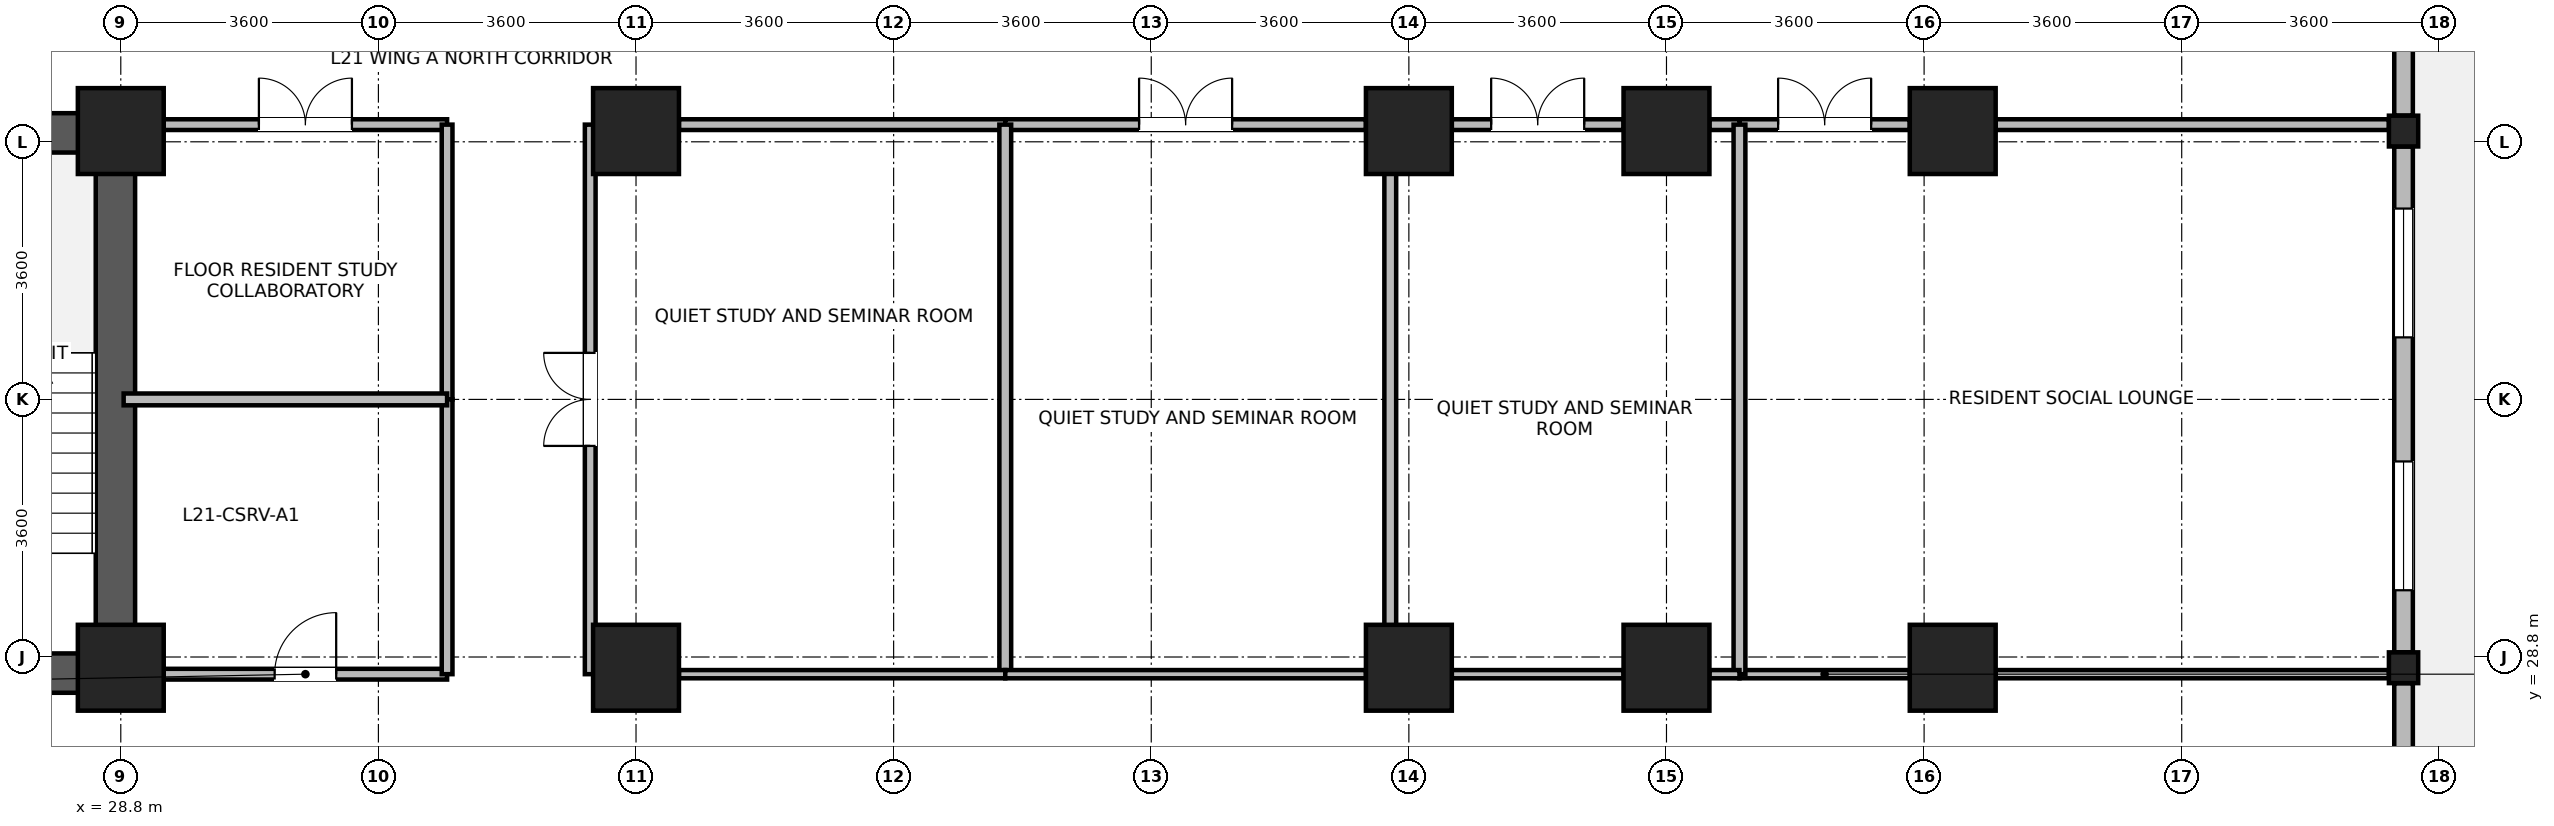
"""IFC4 building model, lengths in metres.
Left out: names, types, materials, properties, quantities, classifications, styles, units other than length and angle.
Written with IfcOpenShell. Run it as: python <this file> out.ifc"""

import sys

from ifc_helpers import new_model, si_unit, direction, frame, frame_2d, origin, origin_2d, place, context, subcontext, project, spatial, rectangle, i_section, extrude, source, transform, mapped, element, fill, save


model = new_model("IFC4")
c1 = context("Model", 3, precision=1e-05, world=origin(), true_north=direction((0.0, 1.0)))
c2 = subcontext(c1, "Body", "Model", "MODEL_VIEW")
j1 = project(units=[si_unit("LENGTHUNIT", "METRE"), si_unit("PLANEANGLEUNIT", "RADIAN")], contexts=[c1])
p1 = place(None, origin())
s1 = spatial("IfcSite", under=j1, at=p1, CompositionType="ELEMENT")
p2 = place(p1, origin())
s2 = spatial("IfcBuilding", under=s1, at=p2, CompositionType="ELEMENT")
p3 = place(p2, frame((0.0, 0.0, 86.0)))
s3 = spatial("IfcBuildingStorey", under=s2, at=p3, CompositionType="ELEMENT", Elevation=86.0)
p4 = place(p3, frame((28.725, 28.3, 0.0), z_axis=(0.0, 0.0, 1.0), x_axis=(0.0, 1.0, 0.0)))
e1 = element("IfcWall", 1, at=p4, inside=s3, PredefinedType="SHEAR", context=c2, shape_type="SweptSolid", body=[
    extrude(rectangle(XDim=8.1, YDim=0.55, at=frame_2d((4.05, 0.0))), origin(), (0.0, 0.0, 1.0), 3.45),
])
for number, where, z_axis, x_axis in (
    (2, (25.25, 28.575, 0.0), (0.0, 0.0, 1.0), (1.0, 0.0, 0.0)),
    (3, (25.25, 36.125, 0.0), (0.0, 0.0, 1.0), (1.0, 0.0, 0.0)),
):
    element("IfcWall", number, at=place(p3, frame(where, z_axis=z_axis, x_axis=x_axis)), inside=s3, PredefinedType="SHEAR", context=c2, shape_type="SweptSolid", body=[
        extrude(rectangle(XDim=3.2, YDim=0.55, at=frame_2d((1.6, 0.0))), origin(), (0.0, 0.0, 1.0), 3.45),
    ])
m1 = source(origin(), c2, "Body", "SweptSolid", [
    extrude(rectangle(XDim=1.2, YDim=1.2, at=origin_2d()), origin(), (0.0, 0.0, 1.0), 3.7),
])
for number, where, z_axis, x_axis in (
    (4, (28.8, 28.65, 0.0), (0.0, 0.0, 1.0), (1.0, 0.0, 0.0)),
    (5, (28.8, 36.15, 0.0), (0.0, 0.0, 1.0), (1.0, 0.0, 0.0)),
    (6, (36.0, 28.65, 0.0), (0.0, 0.0, 1.0), (1.0, 0.0, 0.0)),
    (7, (36.0, 36.15, 0.0), (0.0, 0.0, 1.0), (1.0, 0.0, 0.0)),
    (8, (46.8, 28.65, 0.0), (0.0, 0.0, 1.0), (1.0, 0.0, 0.0)),
    (9, (46.8, 36.15, 0.0), (0.0, 0.0, 1.0), (1.0, 0.0, 0.0)),
    (10, (50.4, 28.65, 0.0), (0.0, 0.0, 1.0), (1.0, 0.0, 0.0)),
    (11, (50.4, 36.15, 0.0), (0.0, 0.0, 1.0), (1.0, 0.0, 0.0)),
    (12, (54.4, 28.65, 0.0), (0.0, 0.0, 1.0), (1.0, 0.0, 0.0)),
    (13, (54.4, 36.15, 0.0), (0.0, 0.0, 1.0), (1.0, 0.0, 0.0)),
):
    element("IfcColumn", number, at=place(p3, frame(where, z_axis=z_axis, x_axis=x_axis)), inside=s3, PredefinedType="COLUMN", context=c2, shape_type="MappedRepresentation", body=[
        mapped(m1, transform((0.0, 0.0, 0.0), x_axis=(1.0, 0.0, 0.0), y_axis=(0.0, 1.0, 0.0), z_axis=(0.0, 0.0, 1.0), scale=1.0)),
    ])
m2 = source(origin(), c2, "Body", "SweptSolid", [
    extrude(i_section(OverallWidth=0.409, OverallDepth=0.43, WebThickness=0.024, FlangeThickness=0.033, FilletRadius=0.015, at=origin_2d()), origin(), (0.0, 0.0, 1.0), 3.7),
])
for number, where, z_axis, x_axis in (
    (14, (60.7, 28.65, 0.0), (0.0, 0.0, 1.0), (1.0, 0.0, 0.0)),
    (15, (60.7, 36.15, 0.0), (0.0, 0.0, 1.0), (1.0, 0.0, 0.0)),
):
    element("IfcColumn", number, at=place(p3, frame(where, z_axis=z_axis, x_axis=x_axis)), inside=s3, PredefinedType="COLUMN", context=c2, shape_type="MappedRepresentation", body=[
        mapped(m2, transform((0.0, 0.0, 0.0), x_axis=(1.0, 0.0, 0.0), y_axis=(0.0, 1.0, 0.0), z_axis=(0.0, 0.0, 1.0), scale=1.0)),
    ])
p5 = place(p3, frame((60.7, 28.434, 0.0), z_axis=(0.0, 0.0, 1.0), x_axis=(0.0, -1.0, 0.0)))
e16 = element("IfcWall", 16, at=p5, inside=s3, PredefinedType="STANDARD", context=c2, shape_type="SweptSolid", body=[
    extrude(rectangle(XDim=6.618, YDim=0.26, at=frame_2d((3.309, 0.0))), origin(), (0.0, 0.0, 1.0), 2.93),
])
p6 = place(p5, frame((4.063, 0.0, 0.85)))
e17 = element("IfcOpeningElement", 17, at=p6, cuts=e16, PredefinedType="OPENING", context=c2, shape_type="SweptSolid", body=[
    extrude(rectangle(XDim=1.8, YDim=1.85, at=frame_2d((0.9, 0.925))), frame((0.0, 0.14, 0.0), z_axis=(0.0, -1.0, 0.0), x_axis=(1.0, 0.0, 0.0)), (0.0, 0.0, 1.0), 0.28),
])
p7 = place(p5, frame((2.305, 0.0, 0.85)))
e18 = element("IfcOpeningElement", 18, at=p7, cuts=e16, PredefinedType="OPENING", context=c2, shape_type="SweptSolid", body=[
    extrude(rectangle(XDim=0.95, YDim=1.75, at=frame_2d((0.475, 0.875))), frame((0.0, 0.14, 0.0), z_axis=(0.0, -1.0, 0.0), x_axis=(1.0, 0.0, 0.0)), (0.0, 0.0, 1.0), 0.28),
])
p8 = place(p3, frame((60.7, 35.934, 0.0), z_axis=(0.0, 0.0, 1.0), x_axis=(0.0, -1.0, 0.0)))
e19 = element("IfcWall", 19, at=p8, inside=s3, PredefinedType="STANDARD", context=c2, shape_type="SweptSolid", body=[
    extrude(rectangle(XDim=7.068, YDim=0.26, at=frame_2d((3.534, 0.0))), origin(), (0.0, 0.0, 1.0), 2.93),
])
p9 = place(p8, frame((0.867, 0.0, 0.85)))
e20 = element("IfcOpeningElement", 20, at=p9, cuts=e19, PredefinedType="OPENING", context=c2, shape_type="SweptSolid", body=[
    extrude(rectangle(XDim=1.8, YDim=1.85, at=frame_2d((0.9, 0.925))), frame((0.0, 0.14, 0.0), z_axis=(0.0, -1.0, 0.0), x_axis=(1.0, 0.0, 0.0)), (0.0, 0.0, 1.0), 0.28),
])
p10 = place(p8, frame((4.401, 0.0, 0.85)))
e21 = element("IfcOpeningElement", 21, at=p10, cuts=e19, PredefinedType="OPENING", context=c2, shape_type="SweptSolid", body=[
    extrude(rectangle(XDim=1.8, YDim=1.85, at=frame_2d((0.9, 0.925))), frame((0.0, 0.14, 0.0), z_axis=(0.0, -1.0, 0.0), x_axis=(1.0, 0.0, 0.0)), (0.0, 0.0, 1.0), 0.28),
])
p11 = place(p3, frame((60.7, 43.33, 0.0), z_axis=(0.0, 0.0, 1.0), x_axis=(0.0, -1.0, 0.0)))
e22 = element("IfcWall", 22, at=p11, inside=s3, PredefinedType="STANDARD", context=c2, shape_type="SweptSolid", body=[
    extrude(rectangle(XDim=6.964, YDim=0.26, at=frame_2d((3.482, 0.0))), origin(), (0.0, 0.0, 1.0), 3.43),
])
p12 = place(p11, frame((0.841, 0.0, 0.85)))
e23 = element("IfcOpeningElement", 23, at=p12, cuts=e22, PredefinedType="OPENING", context=c2, shape_type="SweptSolid", body=[
    extrude(rectangle(XDim=1.8, YDim=1.85, at=frame_2d((0.9, 0.925))), frame((0.0, 0.14, 0.0), z_axis=(0.0, -1.0, 0.0), x_axis=(1.0, 0.0, 0.0)), (0.0, 0.0, 1.0), 0.28),
])
p13 = place(p11, frame((3.007, 0.0, 0.85)))
e24 = element("IfcOpeningElement", 24, at=p13, cuts=e22, PredefinedType="OPENING", context=c2, shape_type="SweptSolid", body=[
    extrude(rectangle(XDim=0.95, YDim=1.75, at=frame_2d((0.475, 0.875))), frame((0.0, 0.14, 0.0), z_axis=(0.0, -1.0, 0.0), x_axis=(1.0, 0.0, 0.0)), (0.0, 0.0, 1.0), 0.28),
])
p14 = place(p3, frame((51.42, 36.24, 0.0), z_axis=(0.0, 0.0, 1.0), x_axis=(1.0, 0.0, 0.0)))
e25 = element("IfcWall", 25, at=p14, inside=s3, PredefinedType="PARTITIONING", context=c2, shape_type="SweptSolid", body=[
    extrude(rectangle(XDim=2.38, YDim=0.15, at=frame_2d((1.19, 0.0))), origin(), (0.0, 0.0, 1.0), 2.78),
])
p15 = place(p14, frame((0.54, 0.0, 0.0)))
e26 = element("IfcOpeningElement", 26, at=p15, cuts=e25, PredefinedType="OPENING", context=c2, shape_type="SweptSolid", body=[
    extrude(rectangle(XDim=1.3, YDim=2.12, at=frame_2d((0.65, 1.06))), frame((0.0, 0.085, 0.0), z_axis=(0.0, -1.0, 0.0), x_axis=(1.0, 0.0, 0.0)), (0.0, 0.0, 1.0), 0.17),
])
p16 = place(p3, frame((55.0, 36.24, 0.0), z_axis=(0.0, 0.0, 1.0), x_axis=(1.0, 0.0, 0.0)))
e27 = element("IfcWall", 27, at=p16, inside=s3, PredefinedType="PARTITIONING", context=c2, shape_type="SweptSolid", body=[
    extrude(rectangle(XDim=5.496, YDim=0.15, at=frame_2d((2.748, 0.0))), origin(), (0.0, 0.0, 1.0), 2.78),
])
p17 = place(p3, frame((35.36, 28.56, 0.0), z_axis=(0.0, 0.0, 1.0), x_axis=(0.0, 1.0, 0.0)))
e28 = element("IfcWall", 28, at=p17, inside=s3, PredefinedType="PARTITIONING", context=c2, shape_type="SweptSolid", body=[
    extrude(rectangle(XDim=7.68, YDim=0.15, at=frame_2d((3.84, 0.0))), origin(), (0.0, 0.0, 1.0), 3.43),
])
p18 = place(p17, frame((3.19, 0.0, 0.0)))
e29 = element("IfcOpeningElement", 29, at=p18, cuts=e28, PredefinedType="OPENING", context=c2, shape_type="SweptSolid", body=[
    extrude(rectangle(XDim=1.3, YDim=2.12, at=frame_2d((0.65, 1.06))), frame((0.0, 0.085, 0.0), z_axis=(0.0, -1.0, 0.0), x_axis=(1.0, 0.0, 0.0)), (0.0, 0.0, 1.0), 0.17),
])
p19 = place(p3, frame((36.6, 36.24, 0.0), z_axis=(0.0, 0.0, 1.0), x_axis=(1.0, 0.0, 0.0)))
e30 = element("IfcWall", 30, at=p19, inside=s3, PredefinedType="PARTITIONING", context=c2, shape_type="SweptSolid", body=[
    extrude(rectangle(XDim=4.56, YDim=0.15, at=frame_2d((2.28, 0.0))), origin(), (0.0, 0.0, 1.0), 2.78),
])
p20 = place(p3, frame((41.16, 36.24, 0.0), z_axis=(0.0, 0.0, 1.0), x_axis=(1.0, 0.0, 0.0)))
e31 = element("IfcWall", 31, at=p20, inside=s3, PredefinedType="PARTITIONING", context=c2, shape_type="SweptSolid", body=[
    extrude(rectangle(XDim=5.04, YDim=0.15, at=frame_2d((2.52, 0.0))), origin(), (0.0, 0.0, 1.0), 2.78),
])
p21 = place(p20, frame((1.87, 0.0, 0.0)))
e32 = element("IfcOpeningElement", 32, at=p21, cuts=e31, PredefinedType="OPENING", context=c2, shape_type="SweptSolid", body=[
    extrude(rectangle(XDim=1.3, YDim=2.12, at=frame_2d((0.65, 1.06))), frame((0.0, 0.085, 0.0), z_axis=(0.0, -1.0, 0.0), x_axis=(1.0, 0.0, 0.0)), (0.0, 0.0, 1.0), 0.17),
])
p22 = place(p3, frame((47.4, 36.24, 0.0), z_axis=(0.0, 0.0, 1.0), x_axis=(1.0, 0.0, 0.0)))
e33 = element("IfcWall", 33, at=p22, inside=s3, PredefinedType="PARTITIONING", context=c2, shape_type="SweptSolid", body=[
    extrude(rectangle(XDim=2.4, YDim=0.15, at=frame_2d((1.2, 0.0))), origin(), (0.0, 0.0, 1.0), 2.78),
])
p23 = place(p22, frame((0.55, 0.0, 0.0)))
e34 = element("IfcOpeningElement", 34, at=p23, cuts=e33, PredefinedType="OPENING", context=c2, shape_type="SweptSolid", body=[
    extrude(rectangle(XDim=1.3, YDim=2.12, at=frame_2d((0.65, 1.06))), frame((0.0, 0.085, 0.0), z_axis=(0.0, -1.0, 0.0), x_axis=(1.0, 0.0, 0.0)), (0.0, 0.0, 1.0), 0.17),
])
p24 = place(p3, frame((51.0, 36.24, 0.0), z_axis=(0.0, 0.0, 1.0), x_axis=(1.0, 0.0, 0.0)))
e35 = element("IfcWall", 35, at=p24, inside=s3, PredefinedType="PARTITIONING", context=c2, shape_type="SweptSolid", body=[
    extrude(rectangle(XDim=0.42, YDim=0.15, at=frame_2d((0.21, 0.0))), origin(), (0.0, 0.0, 1.0), 2.78),
])
p25 = place(p3, frame((29.4, 28.56, 0.0), z_axis=(0.0, 0.0, 1.0), x_axis=(1.0, 0.0, 0.0)))
e36 = element("IfcWall", 36, at=p25, inside=s3, PredefinedType="PARTITIONING", context=c2, shape_type="SweptSolid", body=[
    extrude(rectangle(XDim=3.96, YDim=0.15, at=frame_2d((1.98, 0.0))), origin(), (0.0, 0.0, 1.0), 2.78),
])
p26 = place(p25, frame((1.55, 0.0, 0.0)))
e37 = element("IfcOpeningElement", 37, at=p26, cuts=e36, PredefinedType="OPENING", context=c2, shape_type="SweptSolid", body=[
    extrude(rectangle(XDim=0.86, YDim=2.02, at=frame_2d((0.43, 1.01))), frame((0.0, 0.085, 0.0), z_axis=(0.0, -1.0, 0.0), x_axis=(1.0, 0.0, 0.0)), (0.0, 0.0, 1.0), 0.17),
])
p27 = place(p3, frame((29.4, 36.24, 0.0), z_axis=(0.0, 0.0, 1.0), x_axis=(1.0, 0.0, 0.0)))
e38 = element("IfcWall", 38, at=p27, inside=s3, PredefinedType="PARTITIONING", context=c2, shape_type="SweptSolid", body=[
    extrude(rectangle(XDim=3.96, YDim=0.15, at=frame_2d((1.98, 0.0))), origin(), (0.0, 0.0, 1.0), 2.78),
])
p28 = place(p27, frame((1.33, 0.0, 0.0)))
e39 = element("IfcOpeningElement", 39, at=p28, cuts=e38, PredefinedType="OPENING", context=c2, shape_type="SweptSolid", body=[
    extrude(rectangle(XDim=1.3, YDim=2.12, at=frame_2d((0.65, 1.06))), frame((0.0, 0.085, 0.0), z_axis=(0.0, -1.0, 0.0), x_axis=(1.0, 0.0, 0.0)), (0.0, 0.0, 1.0), 0.17),
])
p29 = place(p3, frame((33.36, 32.4, 0.0), z_axis=(0.0, 0.0, 1.0), x_axis=(0.0, 1.0, 0.0)))
e40 = element("IfcWall", 40, at=p29, inside=s3, PredefinedType="PARTITIONING", context=c2, shape_type="SweptSolid", body=[
    extrude(rectangle(XDim=3.84, YDim=0.15, at=frame_2d((1.92, 0.0))), origin(), (0.0, 0.0, 1.0), 3.43),
])
p30 = place(p3, frame((33.36, 28.56, 0.0), z_axis=(0.0, 0.0, 1.0), x_axis=(0.0, 1.0, 0.0)))
e41 = element("IfcWall", 41, at=p30, inside=s3, PredefinedType="PARTITIONING", context=c2, shape_type="SweptSolid", body=[
    extrude(rectangle(XDim=3.84, YDim=0.15, at=frame_2d((1.92, 0.0))), origin(), (0.0, 0.0, 1.0), 3.43),
])
p31 = place(p3, frame((51.42, 28.56, 0.0), z_axis=(0.0, 0.0, 1.0), x_axis=(1.0, 0.0, 0.0)))
e42 = element("IfcWall", 42, at=p31, inside=s3, PredefinedType="PARTITIONING", context=c2, shape_type="SweptSolid", body=[
    extrude(rectangle(XDim=2.38, YDim=0.115, at=frame_2d((1.19, 0.0))), origin(), (0.0, 0.0, 1.0), 2.78),
])
p32 = place(p3, frame((55.0, 28.56, 0.0), z_axis=(0.0, 0.0, 1.0), x_axis=(1.0, 0.0, 0.0)))
e43 = element("IfcWall", 43, at=p32, inside=s3, PredefinedType="PARTITIONING", context=c2, shape_type="SweptSolid", body=[
    extrude(rectangle(XDim=5.496, YDim=0.115, at=frame_2d((2.748, 0.0))), origin(), (0.0, 0.0, 1.0), 2.78),
])
for number, where, z_axis, x_axis in (
    (44, (41.16, 28.56, 0.0), (0.0, 0.0, 1.0), (0.0, 1.0, 0.0)),
    (45, (46.54, 28.56, 0.0), (0.0, 0.0, 1.0), (0.0, 1.0, 0.0)),
    (46, (51.42, 28.56, 0.0), (0.0, 0.0, 1.0), (0.0, 1.0, 0.0)),
):
    element("IfcWall", number, at=place(p3, frame(where, z_axis=z_axis, x_axis=x_axis)), inside=s3, PredefinedType="PARTITIONING", context=c2, shape_type="SweptSolid", body=[
        extrude(rectangle(XDim=7.68, YDim=0.165, at=frame_2d((3.84, 0.0))), origin(), (0.0, 0.0, 1.0), 3.43),
    ])
p33 = place(p3, frame((36.6, 28.56, 0.0), z_axis=(0.0, 0.0, 1.0), x_axis=(1.0, 0.0, 0.0)))
e47 = element("IfcWall", 47, at=p33, inside=s3, PredefinedType="PARTITIONING", context=c2, shape_type="SweptSolid", body=[
    extrude(rectangle(XDim=4.56, YDim=0.115, at=frame_2d((2.28, 0.0))), origin(), (0.0, 0.0, 1.0), 2.78),
])
p34 = place(p3, frame((41.16, 28.56, 0.0), z_axis=(0.0, 0.0, 1.0), x_axis=(1.0, 0.0, 0.0)))
e48 = element("IfcWall", 48, at=p34, inside=s3, PredefinedType="PARTITIONING", context=c2, shape_type="SweptSolid", body=[
    extrude(rectangle(XDim=5.04, YDim=0.115, at=frame_2d((2.52, 0.0))), origin(), (0.0, 0.0, 1.0), 2.78),
])
p35 = place(p3, frame((47.4, 28.56, 0.0), z_axis=(0.0, 0.0, 1.0), x_axis=(1.0, 0.0, 0.0)))
e49 = element("IfcWall", 49, at=p35, inside=s3, PredefinedType="PARTITIONING", context=c2, shape_type="SweptSolid", body=[
    extrude(rectangle(XDim=2.4, YDim=0.115, at=frame_2d((1.2, 0.0))), origin(), (0.0, 0.0, 1.0), 2.78),
])
p36 = place(p3, frame((51.0, 28.56, 0.0), z_axis=(0.0, 0.0, 1.0), x_axis=(1.0, 0.0, 0.0)))
e50 = element("IfcWall", 50, at=p36, inside=s3, PredefinedType="PARTITIONING", context=c2, shape_type="SweptSolid", body=[
    extrude(rectangle(XDim=0.42, YDim=0.115, at=frame_2d((0.21, 0.0))), origin(), (0.0, 0.0, 1.0), 2.78),
])
p37 = place(p3, frame((28.84, 32.4, 0.0), z_axis=(0.0, 0.0, 1.0), x_axis=(1.0, 0.0, 0.0)))
e51 = element("IfcWall", 51, at=p37, inside=s3, PredefinedType="PARTITIONING", context=c2, shape_type="SweptSolid", body=[
    extrude(rectangle(XDim=4.52, YDim=0.165, at=frame_2d((2.26, 0.0))), origin(), (0.0, 0.0, 1.0), 3.43),
])
p38 = place(p9, origin())
e52 = element("IfcWindow", 52, at=p38, inside=s3, PartitioningType="SINGLE_PANEL", PredefinedType="WINDOW", context=c2, shape_type="SweptSolid", body=[
    extrude(rectangle(XDim=1.8, YDim=1.85, at=frame_2d((0.9, 0.925))), frame((0.0, 0.03, 0.0), z_axis=(0.0, -1.0, 0.0), x_axis=(1.0, 0.0, 0.0)), (0.0, 0.0, 1.0), 0.06),
])
fill(e20, e52)
p39 = place(p10, origin())
e53 = element("IfcWindow", 53, at=p39, inside=s3, PartitioningType="SINGLE_PANEL", PredefinedType="WINDOW", context=c2, shape_type="SweptSolid", body=[
    extrude(rectangle(XDim=1.8, YDim=1.85, at=frame_2d((0.9, 0.925))), frame((0.0, 0.03, 0.0), z_axis=(0.0, -1.0, 0.0), x_axis=(1.0, 0.0, 0.0)), (0.0, 0.0, 1.0), 0.06),
])
fill(e21, e53)
p40 = place(p15, origin())
e54 = element("IfcDoor", 54, at=p40, inside=s3, OperationType="DOUBLE_DOOR_SINGLE_SWING", PredefinedType="DOOR", context=c2, shape_type="SweptSolid", body=[
    extrude(rectangle(XDim=1.3, YDim=2.12, at=frame_2d((0.65, 1.06))), frame((0.0, 0.025, 0.0), z_axis=(0.0, -1.0, 0.0), x_axis=(1.0, 0.0, 0.0)), (0.0, 0.0, 1.0), 0.05),
])
fill(e26, e54)
p41 = place(p18, origin())
e55 = element("IfcDoor", 55, at=p41, inside=s3, OperationType="DOUBLE_DOOR_SINGLE_SWING", PredefinedType="DOOR", context=c2, shape_type="SweptSolid", body=[
    extrude(rectangle(XDim=1.3, YDim=2.12, at=frame_2d((0.65, 1.06))), frame((0.0, 0.025, 0.0), z_axis=(0.0, -1.0, 0.0), x_axis=(1.0, 0.0, 0.0)), (0.0, 0.0, 1.0), 0.05),
])
fill(e29, e55)
p42 = place(p21, origin())
e56 = element("IfcDoor", 56, at=p42, inside=s3, OperationType="DOUBLE_DOOR_SINGLE_SWING", PredefinedType="DOOR", context=c2, shape_type="SweptSolid", body=[
    extrude(rectangle(XDim=1.3, YDim=2.12, at=frame_2d((0.65, 1.06))), frame((0.0, 0.025, 0.0), z_axis=(0.0, -1.0, 0.0), x_axis=(1.0, 0.0, 0.0)), (0.0, 0.0, 1.0), 0.05),
])
fill(e32, e56)
p43 = place(p23, origin())
e57 = element("IfcDoor", 57, at=p43, inside=s3, OperationType="DOUBLE_DOOR_SINGLE_SWING", PredefinedType="DOOR", context=c2, shape_type="SweptSolid", body=[
    extrude(rectangle(XDim=1.3, YDim=2.12, at=frame_2d((0.65, 1.06))), frame((0.0, 0.025, 0.0), z_axis=(0.0, -1.0, 0.0), x_axis=(1.0, 0.0, 0.0)), (0.0, 0.0, 1.0), 0.05),
])
fill(e34, e57)
p44 = place(p26, origin())
e58 = element("IfcDoor", 58, at=p44, inside=s3, OperationType="SINGLE_SWING_RIGHT", PredefinedType="DOOR", context=c2, shape_type="SweptSolid", body=[
    extrude(rectangle(XDim=0.86, YDim=2.02, at=frame_2d((0.43, 1.01))), frame((0.0, 0.025, 0.0), z_axis=(0.0, -1.0, 0.0), x_axis=(1.0, 0.0, 0.0)), (0.0, 0.0, 1.0), 0.05),
])
fill(e37, e58)
p45 = place(p28, origin())
e59 = element("IfcDoor", 59, at=p45, inside=s3, OperationType="DOUBLE_DOOR_SINGLE_SWING", PredefinedType="DOOR", context=c2, shape_type="SweptSolid", body=[
    extrude(rectangle(XDim=1.3, YDim=2.12, at=frame_2d((0.65, 1.06))), frame((0.0, 0.025, 0.0), z_axis=(0.0, -1.0, 0.0), x_axis=(1.0, 0.0, 0.0)), (0.0, 0.0, 1.0), 0.05),
])
fill(e39, e59)
save(model, sys.argv[1])
